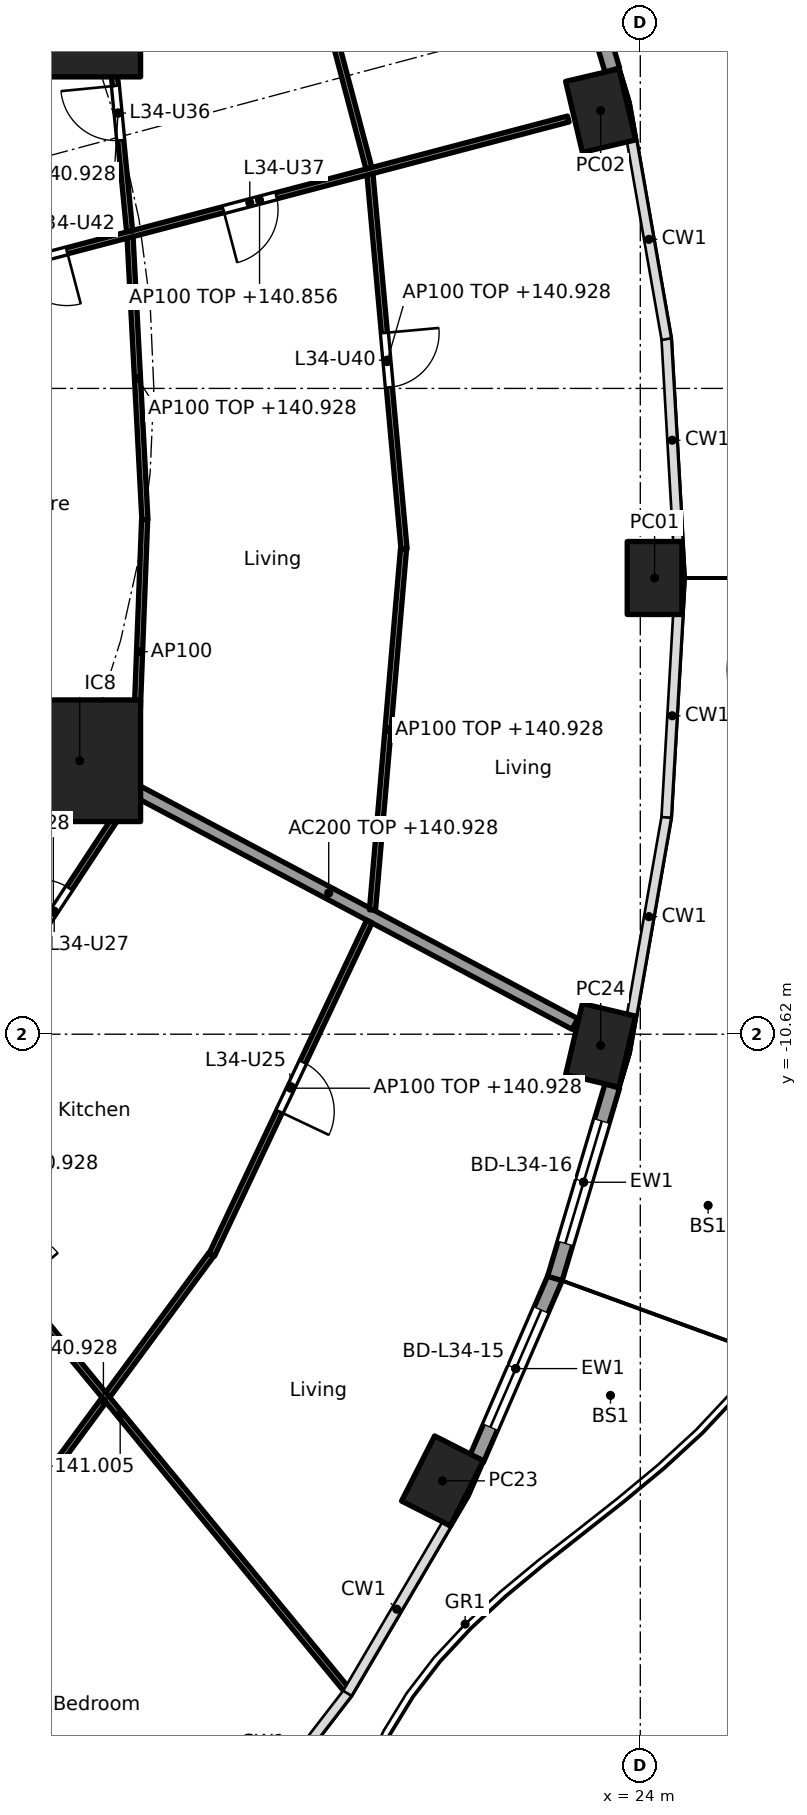
"""IFC4 building model, lengths in metres.
Left out: names, types, materials, properties, quantities, classifications, styles, units other than length and angle.
Written with IfcOpenShell. Run it as: python <this file> out.ifc"""

import sys

from ifc_helpers import new_model, si_unit, direction, frame, frame_2d, origin, origin_2d, place, context, subcontext, project, spatial, rectangle, hollow_rectangle, extrude, element, fill, save


model = new_model("IFC4")
c1 = context("Model", 3, precision=1e-05, world=origin(), true_north=direction((0.0, 1.0)))
c2 = subcontext(c1, "Body", "Model", "MODEL_VIEW")
j1 = project(units=[si_unit("LENGTHUNIT", "METRE"), si_unit("PLANEANGLEUNIT", "RADIAN")], contexts=[c1])
p1 = place(None, origin())
s1 = spatial("IfcSite", under=j1, at=p1, CompositionType="ELEMENT")
p2 = place(p1, origin())
s2 = spatial("IfcBuilding", under=s1, at=p2, CompositionType="ELEMENT")
p3 = place(p2, frame((0.0, 0.0, 138.1)))
s3 = spatial("IfcBuildingStorey", under=s2, at=p3, CompositionType="ELEMENT", Elevation=138.1)
for number, where, z_axis, x_axis in (
    (1, (24.235, -3.118, 0.0), (0.0, 0.0, 1.0), (0.0, 1.0, 0.0)),
    (2, (23.348, 4.568, 0.0), (0.0, 0.0, 1.0), (-0.229, 0.973, 0.0)),
    (3, (20.747, -17.965, 0.0), (0.0, 0.0, 1.0), (0.452, 0.892, 0.0)),
    (4, (23.348, -10.803, 0.0), (0.0, 0.0, 1.0), (0.229, 0.973, 0.0)),
):
    element("IfcColumn", number, at=place(p3, frame(where, z_axis=z_axis, x_axis=x_axis)), inside=s3, PredefinedType="COLUMN", context=c2, shape_type="SweptSolid", body=[
        extrude(hollow_rectangle(XDim=1.2, YDim=0.9, WallThickness=0.04, at=origin_2d()), origin(), (0.0, 0.0, 1.0), 3.7),
    ])
for number, where, z_axis, x_axis in (
    (5, (14.782, 6.123, 0.0), (0.0, 0.0, 1.0), (1.0, 0.0, 0.0)),
    (6, (14.782, -6.123, 0.0), (0.0, 0.0, 1.0), (1.0, 0.0, 0.0)),
):
    element("IfcColumn", number, at=place(p3, frame(where, z_axis=z_axis, x_axis=x_axis)), inside=s3, PredefinedType="COLUMN", context=c2, shape_type="SweptSolid", body=[
        extrude(rectangle(XDim=2.0, YDim=2.0, at=origin_2d()), origin(), (0.0, 0.0, 1.0), 3.7),
    ])
p4 = place(p3, frame((22.595, 8.402, 0.0), z_axis=(0.0, 0.0, 1.0), x_axis=(0.285842038783, -0.958276749621, 0.0)))
e7 = element("IfcWall", 7, at=p4, inside=s3, PredefinedType="SOLIDWALL", context=c2, shape_type="SweptSolid", body=[
    extrude(rectangle(XDim=3.303, YDim=0.25, at=frame_2d((1.651, 0.0))), origin(), (0.0, 0.0, 1.0), 3.44),
])
p5 = place(p4, frame((0.602, 0.0, 0.0)))
e8 = element("IfcOpeningElement", 8, at=p5, cuts=e7, PredefinedType="OPENING", context=c2, shape_type="SweptSolid", body=[
    extrude(rectangle(XDim=2.1, YDim=2.4, at=frame_2d((1.05, 1.2))), frame((0.0, 0.135, 0.0), z_axis=(0.0, -1.0, 0.0), x_axis=(1.0, 0.0, 0.0)), (0.0, 0.0, 1.0), 0.27),
])
p6 = place(p3, frame((22.6, -14.623, 0.0), z_axis=(0.0, 0.0, 1.0), x_axis=(-0.397575919276, -0.917569282622, 0.0)))
e9 = element("IfcWall", 9, at=p6, inside=s3, PredefinedType="SOLIDWALL", context=c2, shape_type="SweptSolid", body=[
    extrude(rectangle(XDim=3.261, YDim=0.25, at=frame_2d((1.63, 0.0))), origin(), (0.0, 0.0, 1.0), 3.44),
])
p7 = place(p6, frame((0.58, 0.0, 0.0)))
e10 = element("IfcOpeningElement", 10, at=p7, cuts=e9, PredefinedType="OPENING", context=c2, shape_type="SweptSolid", body=[
    extrude(rectangle(XDim=2.1, YDim=2.4, at=frame_2d((1.05, 1.2))), frame((0.0, 0.135, 0.0), z_axis=(0.0, -1.0, 0.0), x_axis=(1.0, 0.0, 0.0)), (0.0, 0.0, 1.0), 0.27),
])
p8 = place(p3, frame((23.54, -11.472, 0.0), z_axis=(0.0, 0.0, 1.0), x_axis=(-0.285821792767, -0.958282788523, 0.0)))
e11 = element("IfcWall", 11, at=p8, inside=s3, PredefinedType="SOLIDWALL", context=c2, shape_type="SweptSolid", body=[
    extrude(rectangle(XDim=3.303, YDim=0.25, at=frame_2d((1.651, 0.0))), origin(), (0.0, 0.0, 1.0), 3.44),
])
p9 = place(p8, frame((0.602, 0.0, 0.0)))
e12 = element("IfcOpeningElement", 12, at=p9, cuts=e11, PredefinedType="OPENING", context=c2, shape_type="SweptSolid", body=[
    extrude(rectangle(XDim=2.1, YDim=2.4, at=frame_2d((1.05, 1.2))), frame((0.0, 0.135, 0.0), z_axis=(0.0, -1.0, 0.0), x_axis=(1.0, 0.0, 0.0)), (0.0, 0.0, 1.0), 0.27),
])
p10 = place(p3, frame((12.657, -5.243, 0.0), z_axis=(0.0, 0.0, 1.0), x_axis=(0.923846436004, -0.382763324632, 0.0)))
e13 = element("IfcWall", 13, at=p10, inside=s3, PredefinedType="PARTITIONING", context=c2, shape_type="SweptSolid", body=[
    extrude(rectangle(XDim=2.2, YDim=0.2, at=frame_2d((1.1, 0.0))), origin(), (0.0, 0.0, 1.0), 3.44),
])
p11 = place(p3, frame((14.826, -6.146, 0.0), z_axis=(0.0, 0.0, 1.0), x_axis=(0.883012998471, -0.469348532044, 0.0)))
e14 = element("IfcWall", 14, at=p11, inside=s3, PredefinedType="PARTITIONING", context=c2, shape_type="SweptSolid", body=[
    extrude(rectangle(XDim=9.172, YDim=0.2, at=frame_2d((4.586, 0.0))), origin(), (0.0, 0.0, 1.0), 2.828),
])
p12 = place(p3, frame((15.853, -2.158, 0.0), z_axis=(0.0, 0.0, 1.0), x_axis=(-0.052509224895, 0.998620439056, 0.0)))
e15 = element("IfcWall", 15, at=p12, inside=s3, PredefinedType="PARTITIONING", context=c2, shape_type="SweptSolid", body=[
    extrude(rectangle(XDim=4.649, YDim=0.1, at=frame_2d((2.325, 0.0))), origin(), (0.0, 0.0, 1.0), 2.828),
])
p13 = place(p3, frame((15.849, -2.158, 0.0), z_axis=(0.0, 0.0, 1.0), x_axis=(-0.03838348155, -0.999263082648, 0.0)))
e16 = element("IfcWall", 16, at=p13, inside=s3, PredefinedType="PARTITIONING", context=c2, shape_type="SweptSolid", body=[
    extrude(rectangle(XDim=4.344, YDim=0.1, at=frame_2d((2.172, 0.0))), origin(), (0.0, 0.0, 1.0), 3.44),
])
p14 = place(p3, frame((20.115, -2.642, 0.0), z_axis=(0.0, 0.0, 1.0), x_axis=(-0.090567755363, 0.995890296011, 0.0)))
e17 = element("IfcWall", 17, at=p14, inside=s3, PredefinedType="PARTITIONING", context=c2, shape_type="SweptSolid", body=[
    extrude(rectangle(XDim=6.189, YDim=0.1, at=frame_2d((3.095, 0.0))), origin(), (0.0, 0.0, 1.0), 2.828),
])
p15 = place(p14, frame((2.67, 0.0, 0.0)))
e18 = element("IfcOpeningElement", 18, at=p15, cuts=e17, PredefinedType="OPENING", context=c2, shape_type="SweptSolid", body=[
    extrude(rectangle(XDim=0.9, YDim=2.1, at=frame_2d((0.45, 1.05))), frame((0.0, 0.06, 0.0), z_axis=(0.0, -1.0, 0.0), x_axis=(1.0, 0.0, 0.0)), (0.0, 0.0, 1.0), 0.12),
])
p16 = place(p3, frame((20.106, -2.642, 0.0), z_axis=(0.0, 0.0, 1.0), x_axis=(-0.085694058383, -0.996321498492, 0.0)))
e19 = element("IfcWall", 19, at=p16, inside=s3, PredefinedType="PARTITIONING", context=c2, shape_type="SweptSolid", body=[
    extrude(rectangle(XDim=5.957, YDim=0.1, at=frame_2d((2.979, 0.0))), origin(), (0.0, 0.0, 1.0), 2.828),
])
p17 = place(p3, frame((12.661, 1.76, 0.0), z_axis=(0.0, 0.0, 1.0), x_axis=(0.967120304949, 0.254319318488, 0.0)))
e20 = element("IfcWall", 20, at=p17, inside=s3, PredefinedType="PARTITIONING", context=c2, shape_type="SweptSolid", body=[
    extrude(rectangle(XDim=10.499, YDim=0.1, at=frame_2d((5.25, 0.0))), origin(), (0.0, 0.0, 1.0), 2.756),
])
p18 = place(p17, frame((4.634, 0.0, 0.0)))
e21 = element("IfcOpeningElement", 21, at=p18, cuts=e20, PredefinedType="OPENING", context=c2, shape_type="SweptSolid", body=[
    extrude(rectangle(XDim=0.9, YDim=2.1, at=frame_2d((0.45, 1.05))), frame((0.0, 0.06, 0.0), z_axis=(0.0, -1.0, 0.0), x_axis=(1.0, 0.0, 0.0)), (0.0, 0.0, 1.0), 0.12),
])
p19 = place(p17, frame((1.073, 0.0, 0.0)))
e22 = element("IfcOpeningElement", 22, at=p19, cuts=e20, PredefinedType="OPENING", context=c2, shape_type="SweptSolid", body=[
    extrude(rectangle(XDim=0.9, YDim=2.1, at=frame_2d((0.45, 1.05))), frame((0.0, 0.06, 0.0), z_axis=(0.0, -1.0, 0.0), x_axis=(1.0, 0.0, 0.0)), (0.0, 0.0, 1.0), 0.12),
])
p20 = place(p3, frame((15.602, 2.584, 0.0), z_axis=(0.0, 0.0, 1.0), x_axis=(-0.097207196705, 0.995264166394, 0.0)))
e23 = element("IfcWall", 23, at=p20, inside=s3, PredefinedType="PARTITIONING", context=c2, shape_type="SweptSolid", body=[
    extrude(rectangle(XDim=3.906, YDim=0.1, at=frame_2d((1.953, 0.0))), origin(), (0.0, 0.0, 1.0), 2.828),
])
p21 = place(p20, frame((1.503, 0.0, 0.0)))
e24 = element("IfcOpeningElement", 24, at=p21, cuts=e23, PredefinedType="OPENING", context=c2, shape_type="SweptSolid", body=[
    extrude(rectangle(XDim=0.9, YDim=2.1, at=frame_2d((0.45, 1.05))), frame((0.0, 0.06, 0.0), z_axis=(0.0, -1.0, 0.0), x_axis=(1.0, 0.0, 0.0)), (0.0, 0.0, 1.0), 0.12),
])
p22 = place(p3, frame((19.537, 3.62, 0.0), z_axis=(0.0, 0.0, 1.0), x_axis=(-0.255892560316, 0.966705227862, 0.0)))
e25 = element("IfcWall", 25, at=p22, inside=s3, PredefinedType="PARTITIONING", context=c2, shape_type="SweptSolid", body=[
    extrude(rectangle(XDim=5.659, YDim=0.1, at=frame_2d((2.829, 0.0))), origin(), (0.0, 0.0, 1.0), 2.828),
])
p23 = place(p22, frame((2.379, 0.0, 0.0)))
e26 = element("IfcOpeningElement", 26, at=p23, cuts=e25, PredefinedType="OPENING", context=c2, shape_type="SweptSolid", body=[
    extrude(rectangle(XDim=0.9, YDim=2.1, at=frame_2d((0.45, 1.05))), frame((0.0, 0.06, 0.0), z_axis=(0.0, -1.0, 0.0), x_axis=(1.0, 0.0, 0.0)), (0.0, 0.0, 1.0), 0.12),
])
p24 = place(p3, frame((12.657, 5.243, 0.0), z_axis=(0.0, 0.0, 1.0), x_axis=(0.923864733477, 0.382719158442, 0.0)))
e27 = element("IfcWall", 27, at=p24, inside=s3, PredefinedType="PARTITIONING", context=c2, shape_type="SweptSolid", body=[
    extrude(rectangle(XDim=2.25, YDim=0.1, at=frame_2d((1.125, 0.0))), origin(), (0.0, 0.0, 1.0), 3.44),
])
p25 = place(p3, frame((11.296, -21.005, 0.0), z_axis=(0.0, 0.0, 1.0), x_axis=(0.44991509116, -0.893071335755, 0.0)))
e28 = element("IfcWall", 28, at=p25, inside=s3, PredefinedType="PARTITIONING", context=c2, shape_type="SweptSolid", body=[
    extrude(rectangle(XDim=6.755, YDim=0.1, at=frame_2d((3.377, 0.0))), origin(), (0.0, 0.0, 1.0), 2.905),
])
p26 = place(p25, frame((2.927, 0.0, 0.0)))
e29 = element("IfcOpeningElement", 29, at=p26, cuts=e28, PredefinedType="OPENING", context=c2, shape_type="SweptSolid", body=[
    extrude(rectangle(XDim=0.9, YDim=2.1, at=frame_2d((0.45, 1.05))), frame((0.0, 0.06, 0.0), z_axis=(0.0, -1.0, 0.0), x_axis=(1.0, 0.0, 0.0)), (0.0, 0.0, 1.0), 0.12),
])
p27 = place(p3, frame((13.397, -19.053, 0.0), z_axis=(0.0, 0.0, 1.0), x_axis=(0.593522299069, 0.804817544856, 0.0)))
e30 = element("IfcWall", 30, at=p27, inside=s3, PredefinedType="PARTITIONING", context=c2, shape_type="SweptSolid", body=[
    extrude(rectangle(XDim=5.976, YDim=0.1, at=frame_2d((2.988, 0.0))), origin(), (0.0, 0.0, 1.0), 2.828),
])
p28 = place(p3, frame((11.667, -12.287, 0.0), z_axis=(0.0, 0.0, 1.0), x_axis=(0.635618027424, -0.772003706736, 0.0)))
e31 = element("IfcWall", 31, at=p28, inside=s3, PredefinedType="PARTITIONING", context=c2, shape_type="SweptSolid", body=[
    extrude(rectangle(XDim=11.893, YDim=0.1, at=frame_2d((5.947, 0.0))), origin(), (0.0, 0.0, 1.0), 2.905),
])
p29 = place(p28, frame((2.341, 0.0, 0.0)))
e32 = element("IfcOpeningElement", 32, at=p29, cuts=e31, PredefinedType="OPENING", context=c2, shape_type="SweptSolid", body=[
    extrude(rectangle(XDim=0.9, YDim=2.1, at=frame_2d((0.45, 1.05))), frame((0.0, 0.06, 0.0), z_axis=(0.0, -1.0, 0.0), x_axis=(1.0, 0.0, 0.0)), (0.0, 0.0, 1.0), 0.12),
])
p30 = place(p3, frame((13.072, -10.55, 0.0), z_axis=(0.0, 0.0, 1.0), x_axis=(0.550607247415, 0.834764433295, 0.0)))
e33 = element("IfcWall", 33, at=p30, inside=s3, PredefinedType="PARTITIONING", context=c2, shape_type="SweptSolid", body=[
    extrude(rectangle(XDim=4.633, YDim=0.1, at=frame_2d((2.316, 0.0))), origin(), (0.0, 0.0, 1.0), 2.828),
])
p31 = place(p30, frame((1.891, 0.0, 0.0)))
e34 = element("IfcOpeningElement", 34, at=p31, cuts=e33, PredefinedType="OPENING", context=c2, shape_type="SweptSolid", body=[
    extrude(rectangle(XDim=0.9, YDim=2.1, at=frame_2d((0.45, 1.05))), frame((0.0, 0.06, 0.0), z_axis=(0.0, -1.0, 0.0), x_axis=(1.0, 0.0, 0.0)), (0.0, 0.0, 1.0), 0.12),
])
p32 = place(p3, frame((16.953, -14.249, 0.0), z_axis=(0.0, 0.0, 1.0), x_axis=(0.427438858397, 0.904044259056, 0.0)))
e35 = element("IfcWall", 35, at=p32, inside=s3, PredefinedType="PARTITIONING", context=c2, shape_type="SweptSolid", body=[
    extrude(rectangle(XDim=6.063, YDim=0.1, at=frame_2d((3.031, 0.0))), origin(), (0.0, 0.0, 1.0), 2.828),
])
p33 = place(p32, frame((2.607, 0.0, 0.0)))
e36 = element("IfcOpeningElement", 36, at=p33, cuts=e35, PredefinedType="OPENING", context=c2, shape_type="SweptSolid", body=[
    extrude(rectangle(XDim=0.9, YDim=2.1, at=frame_2d((0.45, 1.05))), frame((0.0, 0.06, 0.0), z_axis=(0.0, -1.0, 0.0), x_axis=(1.0, 0.0, 0.0)), (0.0, 0.0, 1.0), 0.12),
])
p34 = place(p7, origin())
e37 = element("IfcDoor", 37, at=p34, inside=s3, OperationType="SLIDING_TO_LEFT", PredefinedType="DOOR", context=c2, shape_type="SweptSolid", body=[
    extrude(rectangle(XDim=2.1, YDim=2.4, at=frame_2d((1.05, 1.2))), frame((0.0, 0.025, 0.0), z_axis=(0.0, -1.0, 0.0), x_axis=(1.0, 0.0, 0.0)), (0.0, 0.0, 1.0), 0.05),
])
fill(e10, e37)
p35 = place(p9, origin())
e38 = element("IfcDoor", 38, at=p35, inside=s3, OperationType="SLIDING_TO_LEFT", PredefinedType="DOOR", context=c2, shape_type="SweptSolid", body=[
    extrude(rectangle(XDim=2.1, YDim=2.4, at=frame_2d((1.05, 1.2))), frame((0.0, 0.025, 0.0), z_axis=(0.0, -1.0, 0.0), x_axis=(1.0, 0.0, 0.0)), (0.0, 0.0, 1.0), 0.05),
])
fill(e12, e38)
p36 = place(p33, frame((0.9, 0.0, 0.0), x_axis=(-1.0, 0.0, 0.0)))
e39 = element("IfcDoor", 39, at=p36, inside=s3, OperationType="SINGLE_SWING_RIGHT", PredefinedType="DOOR", context=c2, shape_type="SweptSolid", body=[
    extrude(rectangle(XDim=0.9, YDim=2.1, at=frame_2d((0.45, 1.05))), frame((0.0, 0.025, 0.0), z_axis=(0.0, -1.0, 0.0), x_axis=(1.0, 0.0, 0.0)), (0.0, 0.0, 1.0), 0.05),
])
fill(e36, e39)
p37 = place(p31, origin())
e40 = element("IfcDoor", 40, at=p37, inside=s3, OperationType="SINGLE_SWING_LEFT", PredefinedType="DOOR", context=c2, shape_type="SweptSolid", body=[
    extrude(rectangle(XDim=0.9, YDim=2.1, at=frame_2d((0.45, 1.05))), frame((0.0, 0.025, 0.0), z_axis=(0.0, -1.0, 0.0), x_axis=(1.0, 0.0, 0.0)), (0.0, 0.0, 1.0), 0.05),
])
fill(e34, e40)
p38 = place(p21, origin())
e41 = element("IfcDoor", 41, at=p38, inside=s3, OperationType="SINGLE_SWING_RIGHT", PredefinedType="DOOR", context=c2, shape_type="SweptSolid", body=[
    extrude(rectangle(XDim=0.9, YDim=2.1, at=frame_2d((0.45, 1.05))), frame((0.0, 0.025, 0.0), z_axis=(0.0, -1.0, 0.0), x_axis=(1.0, 0.0, 0.0)), (0.0, 0.0, 1.0), 0.05),
])
fill(e24, e41)
p39 = place(p18, frame((0.9, 0.0, 0.0), x_axis=(-1.0, 0.0, 0.0)))
e42 = element("IfcDoor", 42, at=p39, inside=s3, OperationType="SINGLE_SWING_RIGHT", PredefinedType="DOOR", context=c2, shape_type="SweptSolid", body=[
    extrude(rectangle(XDim=0.9, YDim=2.1, at=frame_2d((0.45, 1.05))), frame((0.0, 0.025, 0.0), z_axis=(0.0, -1.0, 0.0), x_axis=(1.0, 0.0, 0.0)), (0.0, 0.0, 1.0), 0.05),
])
fill(e21, e42)
p40 = place(p15, frame((0.9, 0.0, 0.0), x_axis=(-1.0, 0.0, 0.0)))
e43 = element("IfcDoor", 43, at=p40, inside=s3, OperationType="SINGLE_SWING_LEFT", PredefinedType="DOOR", context=c2, shape_type="SweptSolid", body=[
    extrude(rectangle(XDim=0.9, YDim=2.1, at=frame_2d((0.45, 1.05))), frame((0.0, 0.025, 0.0), z_axis=(0.0, -1.0, 0.0), x_axis=(1.0, 0.0, 0.0)), (0.0, 0.0, 1.0), 0.05),
])
fill(e18, e43)
p41 = place(p19, frame((0.9, 0.0, 0.0), x_axis=(-1.0, 0.0, 0.0)))
e44 = element("IfcDoor", 44, at=p41, inside=s3, OperationType="SINGLE_SWING_LEFT", PredefinedType="DOOR", context=c2, shape_type="SweptSolid", body=[
    extrude(rectangle(XDim=0.9, YDim=2.1, at=frame_2d((0.45, 1.05))), frame((0.0, 0.025, 0.0), z_axis=(0.0, -1.0, 0.0), x_axis=(1.0, 0.0, 0.0)), (0.0, 0.0, 1.0), 0.05),
])
fill(e22, e44)
save(model, sys.argv[1])
